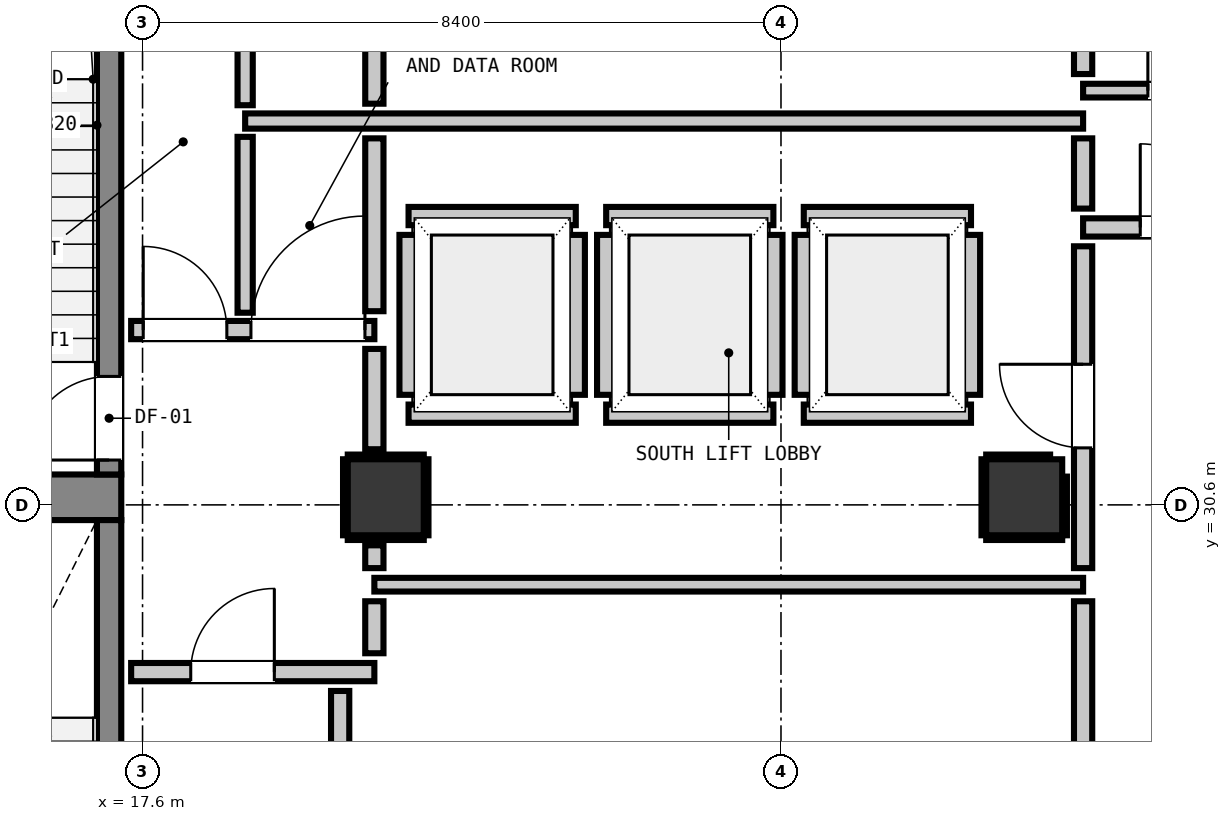
"""IFC4 building model, lengths in metres.
Left out: names, types, materials, properties, quantities, classifications, styles, units other than length and angle.
Written with IfcOpenShell. Run it as: python <this file> out.ifc"""

import sys

from ifc_helpers import new_model, si_unit, direction, frame, frame_2d, origin, origin_2d, place, context, subcontext, project, spatial, rectangle, extrude, element, fill, save


model = new_model("IFC4")
c1 = context("Model", 3, precision=1e-05, world=origin(), true_north=direction((0.0, 1.0)))
c2 = subcontext(c1, "Body", "Model", "MODEL_VIEW")
j1 = project(units=[si_unit("LENGTHUNIT", "METRE"), si_unit("PLANEANGLEUNIT", "RADIAN")], contexts=[c1])
p1 = place(None, origin())
s1 = spatial("IfcSite", under=j1, at=p1, CompositionType="ELEMENT")
p2 = place(p1, origin())
s2 = spatial("IfcBuilding", under=s1, at=p2, CompositionType="ELEMENT")
p3 = place(p2, frame((0.0, 0.0, 88.4)))
s3 = spatial("IfcBuildingStorey", under=s2, at=p3, CompositionType="ELEMENT", Elevation=88.4)
p4 = place(p3, frame((13.905, 30.7, 0.0), z_axis=(0.0, 0.0, 1.0), x_axis=(1.0, 0.0, 0.0)))
e1 = element("IfcWall", 1, at=p4, inside=s3, PredefinedType="SHEAR", context=c2, shape_type="SweptSolid", body=[
    extrude(rectangle(XDim=3.415, YDim=0.6, at=frame_2d((1.708, 0.0))), origin(), (0.0, 0.0, 1.0), 4.4),
])
p5 = place(p3, frame((17.16, 31.0, 0.0), z_axis=(0.0, 0.0, 1.0), x_axis=(0.0, 1.0, 0.0)))
e2 = element("IfcWall", 2, at=p5, inside=s3, PredefinedType="SHEAR", context=c2, shape_type="SweptSolid", body=[
    extrude(rectangle(XDim=7.8, YDim=0.32, at=frame_2d((3.9, 0.0))), origin(), (0.0, 0.0, 1.0), 4.4),
])
p6 = place(p5, frame((0.19, 0.0, 0.0)))
e3 = element("IfcOpeningElement", 3, at=p6, cuts=e2, PredefinedType="OPENING", context=c2, shape_type="SweptSolid", body=[
    extrude(rectangle(XDim=1.1, YDim=2.15, at=frame_2d((0.55, 1.075))), frame((0.0, 0.17, 0.0), z_axis=(0.0, -1.0, 0.0), x_axis=(1.0, 0.0, 0.0)), (0.0, 0.0, 1.0), 0.34),
])
p7 = place(p3, frame((17.16, 22.5, 0.0), z_axis=(0.0, 0.0, 1.0), x_axis=(0.0, 1.0, 0.0)))
e4 = element("IfcWall", 4, at=p7, inside=s3, PredefinedType="SHEAR", context=c2, shape_type="SweptSolid", body=[
    extrude(rectangle(XDim=7.9, YDim=0.32, at=frame_2d((3.95, 0.0))), origin(), (0.0, 0.0, 1.0), 4.4),
])
p8 = place(p7, frame((0.29, 0.0, 0.0)))
e5 = element("IfcOpeningElement", 5, at=p8, cuts=e4, PredefinedType="OPENING", context=c2, shape_type="SweptSolid", body=[
    extrude(rectangle(XDim=1.1, YDim=2.15, at=frame_2d((0.55, 1.075))), frame((0.0, 0.17, 0.0), z_axis=(0.0, -1.0, 0.0), x_axis=(1.0, 0.0, 0.0)), (0.0, 0.0, 1.0), 0.34),
])
for number, where, z_axis, x_axis in (
    (6, (20.8, 30.7, 0.0), (0.0, 0.0, 1.0), (1.0, 0.0, 0.0)),
    (7, (29.2, 30.7, 0.0), (0.0, 0.0, 1.0), (1.0, 0.0, 0.0)),
):
    element("IfcColumn", number, at=place(p3, frame(where, z_axis=z_axis, x_axis=x_axis)), inside=s3, PredefinedType="COLUMN", context=c2, shape_type="SweptSolid", body=[
        extrude(rectangle(XDim=1.0, YDim=1.0, at=origin_2d()), origin(), (0.0, 0.0, 1.0), 4.4),
    ])
for number, where, z_axis, x_axis in (
    (8, (21.1, 31.8, 0.0), (0.0, 0.0, 1.0), (1.0, 0.0, 0.0)),
    (9, (21.1, 34.4, 0.0), (0.0, 0.0, 1.0), (1.0, 0.0, 0.0)),
):
    element("IfcWall", number, at=place(p3, frame(where, z_axis=z_axis, x_axis=x_axis)), inside=s3, PredefinedType="PARTITIONING", context=c2, shape_type="SweptSolid", body=[
        extrude(rectangle(XDim=2.2, YDim=0.24, at=frame_2d((1.1, 0.0))), origin(), (0.0, 0.0, 1.0), 4.14),
    ])
p9 = place(p3, frame((21.1, 32.048, 0.0), z_axis=(0.0, 0.0, 1.0), x_axis=(0.0, 1.0, 0.0)))
e10 = element("IfcWall", 10, at=p9, inside=s3, PredefinedType="PARTITIONING", context=c2, shape_type="SweptSolid", body=[
    extrude(rectangle(XDim=2.104, YDim=0.24, at=frame_2d((1.052, 0.0))), origin(), (0.0, 0.0, 1.0), 3.375),
])
p10 = place(p3, frame((23.3, 32.048, 0.0), z_axis=(0.0, 0.0, 1.0), x_axis=(0.0, 1.0, 0.0)))
e11 = element("IfcWall", 11, at=p10, inside=s3, PredefinedType="PARTITIONING", context=c2, shape_type="SweptSolid", body=[
    extrude(rectangle(XDim=2.104, YDim=0.24, at=frame_2d((1.052, 0.0))), origin(), (0.0, 0.0, 1.0), 4.14),
])
for number, where, z_axis, x_axis in (
    (12, (23.7, 31.8, 0.0), (0.0, 0.0, 1.0), (1.0, 0.0, 0.0)),
    (13, (23.7, 34.4, 0.0), (0.0, 0.0, 1.0), (1.0, 0.0, 0.0)),
):
    element("IfcWall", number, at=place(p3, frame(where, z_axis=z_axis, x_axis=x_axis)), inside=s3, PredefinedType="PARTITIONING", context=c2, shape_type="SweptSolid", body=[
        extrude(rectangle(XDim=2.2, YDim=0.24, at=frame_2d((1.1, 0.0))), origin(), (0.0, 0.0, 1.0), 4.14),
    ])
for number, where, z_axis, x_axis in (
    (14, (23.7, 32.048, 0.0), (0.0, 0.0, 1.0), (0.0, 1.0, 0.0)),
    (15, (25.9, 32.048, 0.0), (0.0, 0.0, 1.0), (0.0, 1.0, 0.0)),
):
    element("IfcWall", number, at=place(p3, frame(where, z_axis=z_axis, x_axis=x_axis)), inside=s3, PredefinedType="PARTITIONING", context=c2, shape_type="SweptSolid", body=[
        extrude(rectangle(XDim=2.104, YDim=0.24, at=frame_2d((1.052, 0.0))), origin(), (0.0, 0.0, 1.0), 4.14),
    ])
for number, where, z_axis, x_axis in (
    (16, (26.3, 31.8, 0.0), (0.0, 0.0, 1.0), (1.0, 0.0, 0.0)),
    (17, (26.3, 34.4, 0.0), (0.0, 0.0, 1.0), (1.0, 0.0, 0.0)),
):
    element("IfcWall", number, at=place(p3, frame(where, z_axis=z_axis, x_axis=x_axis)), inside=s3, PredefinedType="PARTITIONING", context=c2, shape_type="SweptSolid", body=[
        extrude(rectangle(XDim=2.2, YDim=0.24, at=frame_2d((1.1, 0.0))), origin(), (0.0, 0.0, 1.0), 4.14),
    ])
for number, where, z_axis, x_axis in (
    (18, (26.3, 32.048, 0.0), (0.0, 0.0, 1.0), (0.0, 1.0, 0.0)),
    (19, (28.5, 32.048, 0.0), (0.0, 0.0, 1.0), (0.0, 1.0, 0.0)),
):
    element("IfcWall", number, at=place(p3, frame(where, z_axis=z_axis, x_axis=x_axis)), inside=s3, PredefinedType="PARTITIONING", context=c2, shape_type="SweptSolid", body=[
        extrude(rectangle(XDim=2.104, YDim=0.24, at=frame_2d((1.052, 0.0))), origin(), (0.0, 0.0, 1.0), 4.14),
    ])
p11 = place(p3, frame((17.45, 28.4, 0.0), z_axis=(0.0, 0.0, 1.0), x_axis=(1.0, 0.0, 0.0)))
e20 = element("IfcWall", 20, at=p11, inside=s3, PredefinedType="PARTITIONING", context=c2, shape_type="SweptSolid", body=[
    extrude(rectangle(XDim=3.2, YDim=0.24, at=frame_2d((1.6, 0.0))), origin(), (0.0, 0.0, 1.0), 4.14),
])
p12 = place(p11, frame((0.784, 0.0, 0.0)))
e21 = element("IfcOpeningElement", 21, at=p12, cuts=e20, PredefinedType="OPENING", context=c2, shape_type="SweptSolid", body=[
    extrude(rectangle(XDim=1.1, YDim=2.15, at=frame_2d((0.55, 1.075))), frame((0.0, 0.13, 0.0), z_axis=(0.0, -1.0, 0.0), x_axis=(1.0, 0.0, 0.0)), (0.0, 0.0, 1.0), 0.26),
])
p13 = place(p3, frame((17.45, 32.9, 0.0), z_axis=(0.0, 0.0, 1.0), x_axis=(1.0, 0.0, 0.0)))
e22 = element("IfcWall", 22, at=p13, inside=s3, PredefinedType="PARTITIONING", context=c2, shape_type="SweptSolid", body=[
    extrude(rectangle(XDim=3.2, YDim=0.24, at=frame_2d((1.6, 0.0))), origin(), (0.0, 0.0, 1.0), 4.14),
])
p14 = place(p13, frame((0.159, 0.0, 0.0)))
e23 = element("IfcOpeningElement", 23, at=p14, cuts=e22, PredefinedType="OPENING", context=c2, shape_type="SweptSolid", body=[
    extrude(rectangle(XDim=1.1, YDim=2.15, at=frame_2d((0.55, 1.075))), frame((0.0, 0.13, 0.0), z_axis=(0.0, -1.0, 0.0), x_axis=(1.0, 0.0, 0.0)), (0.0, 0.0, 1.0), 0.26),
])
p15 = place(p13, frame((1.576, 0.0, 0.0)))
e24 = element("IfcOpeningElement", 24, at=p15, cuts=e22, PredefinedType="OPENING", context=c2, shape_type="SweptSolid", body=[
    extrude(rectangle(XDim=1.5, YDim=2.15, at=frame_2d((0.75, 1.075))), frame((0.0, 0.13, 0.0), z_axis=(0.0, -1.0, 0.0), x_axis=(1.0, 0.0, 0.0)), (0.0, 0.0, 1.0), 0.26),
])
p16 = place(p3, frame((29.975, 34.25, 0.0), z_axis=(0.0, 0.0, 1.0), x_axis=(1.0, 0.0, 0.0)))
e25 = element("IfcWall", 25, at=p16, inside=s3, PredefinedType="PARTITIONING", context=c2, shape_type="SweptSolid", body=[
    extrude(rectangle(XDim=2.475, YDim=0.24, at=frame_2d((1.237, 0.0))), origin(), (0.0, 0.0, 1.0), 4.14),
])
p17 = place(p16, frame((0.752, 0.0, 0.0)))
e26 = element("IfcOpeningElement", 26, at=p17, cuts=e25, PredefinedType="OPENING", context=c2, shape_type="SweptSolid", body=[
    extrude(rectangle(XDim=1.1, YDim=2.15, at=frame_2d((0.55, 1.075))), frame((0.0, 0.13, 0.0), z_axis=(0.0, -1.0, 0.0), x_axis=(1.0, 0.0, 0.0)), (0.0, 0.0, 1.0), 0.26),
])
p18 = place(p3, frame((18.95, 35.65, 0.0), z_axis=(0.0, 0.0, 1.0), x_axis=(1.0, 0.0, 0.0)))
e27 = element("IfcWall", 27, at=p18, inside=s3, PredefinedType="PARTITIONING", context=c2, shape_type="SweptSolid", body=[
    extrude(rectangle(XDim=11.025, YDim=0.2, at=frame_2d((5.513, 0.0))), origin(), (0.0, 0.0, 1.0), 4.14),
])
p19 = place(p3, frame((20.65, 29.55, 0.0), z_axis=(0.0, 0.0, 1.0), x_axis=(1.0, 0.0, 0.0)))
e28 = element("IfcWall", 28, at=p19, inside=s3, PredefinedType="PARTITIONING", context=c2, shape_type="SweptSolid", body=[
    extrude(rectangle(XDim=9.325, YDim=0.18, at=frame_2d((4.663, 0.0))), origin(), (0.0, 0.0, 1.0), 4.14),
])
p20 = place(p3, frame((29.975, 36.05, 0.0), z_axis=(0.0, 0.0, 1.0), x_axis=(1.0, 0.0, 0.0)))
e29 = element("IfcWall", 29, at=p20, inside=s3, PredefinedType="PARTITIONING", context=c2, shape_type="SweptSolid", body=[
    extrude(rectangle(XDim=2.505, YDim=0.18, at=frame_2d((1.252, 0.0))), origin(), (0.0, 0.0, 1.0), 4.14),
])
p21 = place(p20, frame((0.852, 0.0, 0.0)))
e30 = element("IfcOpeningElement", 30, at=p21, cuts=e29, PredefinedType="OPENING", context=c2, shape_type="SweptSolid", body=[
    extrude(rectangle(XDim=0.9, YDim=2.1, at=frame_2d((0.45, 1.05))), frame((0.0, 0.1, 0.0), z_axis=(0.0, -1.0, 0.0), x_axis=(1.0, 0.0, 0.0)), (0.0, 0.0, 1.0), 0.2),
])
p22 = place(p3, frame((20.2, 22.586, 0.0), z_axis=(0.0, 0.0, 1.0), x_axis=(0.0, 1.0, 0.0)))
e31 = element("IfcWall", 31, at=p22, inside=s3, PredefinedType="PARTITIONING", context=c2, shape_type="SweptSolid", body=[
    extrude(rectangle(XDim=5.566, YDim=0.24, at=frame_2d((2.783, 0.0))), origin(), (0.0, 0.0, 1.0), 4.14),
])
p23 = place(p3, frame((20.65, 28.648, 0.0), z_axis=(0.0, 0.0, 1.0), x_axis=(0.0, 1.0, 0.0)))
e32 = element("IfcWall", 32, at=p23, inside=s3, PredefinedType="PARTITIONING", context=c2, shape_type="SweptSolid", body=[
    extrude(rectangle(XDim=0.684, YDim=0.24, at=frame_2d((0.342, 0.0))), origin(), (0.0, 0.0, 1.0), 3.375),
])
p24 = place(p3, frame((20.65, 29.768, 0.0), z_axis=(0.0, 0.0, 1.0), x_axis=(0.0, 1.0, 0.0)))
e33 = element("IfcWall", 33, at=p24, inside=s3, PredefinedType="PARTITIONING", context=c2, shape_type="SweptSolid", body=[
    extrude(rectangle(XDim=0.3, YDim=0.24, at=frame_2d((0.15, 0.0))), origin(), (0.0, 0.0, 1.0), 3.375),
])
p25 = place(p3, frame((20.65, 31.332, 0.0), z_axis=(0.0, 0.0, 1.0), x_axis=(0.0, 1.0, 0.0)))
e34 = element("IfcWall", 34, at=p25, inside=s3, PredefinedType="PARTITIONING", context=c2, shape_type="SweptSolid", body=[
    extrude(rectangle(XDim=1.32, YDim=0.24, at=frame_2d((0.66, 0.0))), origin(), (0.0, 0.0, 1.0), 3.375),
])
p26 = place(p3, frame((20.65, 33.148, 0.0), z_axis=(0.0, 0.0, 1.0), x_axis=(0.0, 1.0, 0.0)))
e35 = element("IfcWall", 35, at=p26, inside=s3, PredefinedType="PARTITIONING", context=c2, shape_type="SweptSolid", body=[
    extrude(rectangle(XDim=2.274, YDim=0.24, at=frame_2d((1.137, 0.0))), origin(), (0.0, 0.0, 1.0), 3.375),
])
p27 = place(p3, frame((20.65, 35.878, 0.0), z_axis=(0.0, 0.0, 1.0), x_axis=(0.0, 1.0, 0.0)))
e36 = element("IfcWall", 36, at=p27, inside=s3, PredefinedType="PARTITIONING", context=c2, shape_type="SweptSolid", body=[
    extrude(rectangle(XDim=2.674, YDim=0.24, at=frame_2d((1.337, 0.0))), origin(), (0.0, 0.0, 1.0), 3.375),
])
p28 = place(p3, frame((29.975, 25.648, 0.0), z_axis=(0.0, 0.0, 1.0), x_axis=(0.0, 1.0, 0.0)))
e37 = element("IfcWall", 37, at=p28, inside=s3, PredefinedType="PARTITIONING", context=c2, shape_type="SweptSolid", body=[
    extrude(rectangle(XDim=3.684, YDim=0.24, at=frame_2d((1.842, 0.0))), origin(), (0.0, 0.0, 1.0), 4.14),
])
p29 = place(p3, frame((29.975, 29.768, 0.0), z_axis=(0.0, 0.0, 1.0), x_axis=(0.0, 1.0, 0.0)))
e38 = element("IfcWall", 38, at=p29, inside=s3, PredefinedType="PARTITIONING", context=c2, shape_type="SweptSolid", body=[
    extrude(rectangle(XDim=4.234, YDim=0.24, at=frame_2d((2.117, 0.0))), origin(), (0.0, 0.0, 1.0), 4.14),
])
p30 = place(p29, frame((1.582, 0.0, 0.0)))
e39 = element("IfcOpeningElement", 39, at=p30, cuts=e38, PredefinedType="OPENING", context=c2, shape_type="SweptSolid", body=[
    extrude(rectangle(XDim=1.1, YDim=2.15, at=frame_2d((0.55, 1.075))), frame((0.0, 0.13, 0.0), z_axis=(0.0, -1.0, 0.0), x_axis=(1.0, 0.0, 0.0)), (0.0, 0.0, 1.0), 0.26),
])
p31 = place(p3, frame((29.975, 34.498, 0.0), z_axis=(0.0, 0.0, 1.0), x_axis=(0.0, 1.0, 0.0)))
e40 = element("IfcWall", 40, at=p31, inside=s3, PredefinedType="PARTITIONING", context=c2, shape_type="SweptSolid", body=[
    extrude(rectangle(XDim=0.924, YDim=0.24, at=frame_2d((0.462, 0.0))), origin(), (0.0, 0.0, 1.0), 4.14),
])
p32 = place(p3, frame((29.975, 36.268, 0.0), z_axis=(0.0, 0.0, 1.0), x_axis=(0.0, 1.0, 0.0)))
e41 = element("IfcWall", 41, at=p32, inside=s3, PredefinedType="PARTITIONING", context=c2, shape_type="SweptSolid", body=[
    extrude(rectangle(XDim=2.284, YDim=0.24, at=frame_2d((1.142, 0.0))), origin(), (0.0, 0.0, 1.0), 4.14),
])
p33 = place(p3, frame((18.95, 33.128, 0.0), z_axis=(0.0, 0.0, 1.0), x_axis=(0.0, 1.0, 0.0)))
e42 = element("IfcWall", 42, at=p33, inside=s3, PredefinedType="PARTITIONING", context=c2, shape_type="SweptSolid", body=[
    extrude(rectangle(XDim=2.314, YDim=0.2, at=frame_2d((1.157, 0.0))), origin(), (0.0, 0.0, 1.0), 4.14),
])
p34 = place(p3, frame((18.95, 35.858, 0.0), z_axis=(0.0, 0.0, 1.0), x_axis=(0.0, 1.0, 0.0)))
e43 = element("IfcWall", 43, at=p34, inside=s3, PredefinedType="PARTITIONING", context=c2, shape_type="SweptSolid", body=[
    extrude(rectangle(XDim=2.714, YDim=0.2, at=frame_2d((1.357, 0.0))), origin(), (0.0, 0.0, 1.0), 4.14),
])
p35 = place(p34, frame((0.867, 0.0, 0.0)))
e44 = element("IfcOpeningElement", 44, at=p35, cuts=e43, PredefinedType="OPENING", context=c2, shape_type="SweptSolid", body=[
    extrude(rectangle(XDim=0.95, YDim=2.1, at=frame_2d((0.475, 1.05))), frame((0.0, 0.11, 0.0), z_axis=(0.0, -1.0, 0.0), x_axis=(1.0, 0.0, 0.0)), (0.0, 0.0, 1.0), 0.22),
])
for number, where, z_axis, x_axis in (
    (45, (20.3, 30.168, 0.0), (0.0, 0.0, 1.0), (1.0, 0.0, 0.0)),
    (46, (20.3, 31.232, 0.0), (0.0, 0.0, 1.0), (1.0, 0.0, 0.0)),
    (47, (20.268, 30.2, 0.0), (0.0, 0.0, 1.0), (0.0, 1.0, 0.0)),
    (48, (21.332, 30.2, 0.0), (0.0, 0.0, 1.0), (0.0, 1.0, 0.0)),
    (49, (28.7, 30.168, 0.0), (0.0, 0.0, 1.0), (1.0, 0.0, 0.0)),
):
    element("IfcWall", number, at=place(p3, frame(where, z_axis=z_axis, x_axis=x_axis)), inside=s3, PredefinedType="PARTITIONING", context=c2, shape_type="SweptSolid", body=[
        extrude(rectangle(XDim=1.0, YDim=0.06, at=frame_2d((0.5, 0.0))), origin(), (0.0, 0.0, 1.0), 1.45),
    ])
p36 = place(p3, frame((28.7, 31.232, 0.0), z_axis=(0.0, 0.0, 1.0), x_axis=(1.0, 0.0, 0.0)))
e50 = element("IfcWall", 50, at=p36, inside=s3, PredefinedType="PARTITIONING", context=c2, shape_type="SweptSolid", body=[
    extrude(rectangle(XDim=0.841, YDim=0.06, at=frame_2d((0.42, 0.0))), origin(), (0.0, 0.0, 1.0), 1.45),
])
p37 = place(p3, frame((28.668, 30.2, 0.0), z_axis=(0.0, 0.0, 1.0), x_axis=(0.0, 1.0, 0.0)))
e51 = element("IfcWall", 51, at=p37, inside=s3, PredefinedType="PARTITIONING", context=c2, shape_type="SweptSolid", body=[
    extrude(rectangle(XDim=1.0, YDim=0.06, at=frame_2d((0.5, 0.0))), origin(), (0.0, 0.0, 1.0), 1.45),
])
p38 = place(p3, frame((29.732, 30.2, 0.0), z_axis=(0.0, 0.0, 1.0), x_axis=(0.0, 1.0, 0.0)))
e52 = element("IfcWall", 52, at=p38, inside=s3, PredefinedType="PARTITIONING", context=c2, shape_type="SweptSolid", body=[
    extrude(rectangle(XDim=0.772, YDim=0.06, at=frame_2d((0.386, 0.0))), origin(), (0.0, 0.0, 1.0), 1.45),
])
p39 = place(p6, origin())
e53 = element("IfcDoor", 53, at=p39, inside=s3, OperationType="SINGLE_SWING_LEFT", PredefinedType="DOOR", context=c2, shape_type="SweptSolid", body=[
    extrude(rectangle(XDim=1.1, YDim=2.15, at=frame_2d((0.55, 1.075))), frame((0.0, 0.025, 0.0), z_axis=(0.0, -1.0, 0.0), x_axis=(1.0, 0.0, 0.0)), (0.0, 0.0, 1.0), 0.05),
])
fill(e3, e53)
p40 = place(p12, origin())
e54 = element("IfcDoor", 54, at=p40, inside=s3, OperationType="SINGLE_SWING_RIGHT", PredefinedType="DOOR", context=c2, shape_type="SweptSolid", body=[
    extrude(rectangle(XDim=1.1, YDim=2.15, at=frame_2d((0.55, 1.075))), frame((0.0, 0.025, 0.0), z_axis=(0.0, -1.0, 0.0), x_axis=(1.0, 0.0, 0.0)), (0.0, 0.0, 1.0), 0.05),
])
fill(e21, e54)
p41 = place(p14, origin())
e55 = element("IfcDoor", 55, at=p41, inside=s3, OperationType="SINGLE_SWING_LEFT", PredefinedType="DOOR", context=c2, shape_type="SweptSolid", body=[
    extrude(rectangle(XDim=1.1, YDim=2.15, at=frame_2d((0.55, 1.075))), frame((0.0, 0.025, 0.0), z_axis=(0.0, -1.0, 0.0), x_axis=(1.0, 0.0, 0.0)), (0.0, 0.0, 1.0), 0.05),
])
fill(e23, e55)
p42 = place(p30, origin())
e56 = element("IfcDoor", 56, at=p42, inside=s3, OperationType="SINGLE_SWING_RIGHT", PredefinedType="DOOR", context=c2, shape_type="SweptSolid", body=[
    extrude(rectangle(XDim=1.1, YDim=2.15, at=frame_2d((0.55, 1.075))), frame((0.0, 0.025, 0.0), z_axis=(0.0, -1.0, 0.0), x_axis=(1.0, 0.0, 0.0)), (0.0, 0.0, 1.0), 0.05),
])
fill(e39, e56)
p43 = place(p17, origin())
e57 = element("IfcDoor", 57, at=p43, inside=s3, OperationType="SINGLE_SWING_LEFT", PredefinedType="DOOR", context=c2, shape_type="SweptSolid", body=[
    extrude(rectangle(XDim=1.1, YDim=2.15, at=frame_2d((0.55, 1.075))), frame((0.0, 0.025, 0.0), z_axis=(0.0, -1.0, 0.0), x_axis=(1.0, 0.0, 0.0)), (0.0, 0.0, 1.0), 0.05),
])
fill(e26, e57)
p44 = place(p15, origin())
e58 = element("IfcDoor", 58, at=p44, inside=s3, OperationType="SINGLE_SWING_RIGHT", PredefinedType="DOOR", context=c2, shape_type="SweptSolid", body=[
    extrude(rectangle(XDim=1.5, YDim=2.15, at=frame_2d((0.75, 1.075))), frame((0.0, 0.025, 0.0), z_axis=(0.0, -1.0, 0.0), x_axis=(1.0, 0.0, 0.0)), (0.0, 0.0, 1.0), 0.05),
])
fill(e24, e58)
p45 = place(p21, origin())
e59 = element("IfcDoor", 59, at=p45, inside=s3, OperationType="SINGLE_SWING_LEFT", PredefinedType="DOOR", context=c2, shape_type="SweptSolid", body=[
    extrude(rectangle(XDim=0.9, YDim=2.1, at=frame_2d((0.45, 1.05))), frame((0.0, 0.025, 0.0), z_axis=(0.0, -1.0, 0.0), x_axis=(1.0, 0.0, 0.0)), (0.0, 0.0, 1.0), 0.05),
])
fill(e30, e59)
save(model, sys.argv[1])
